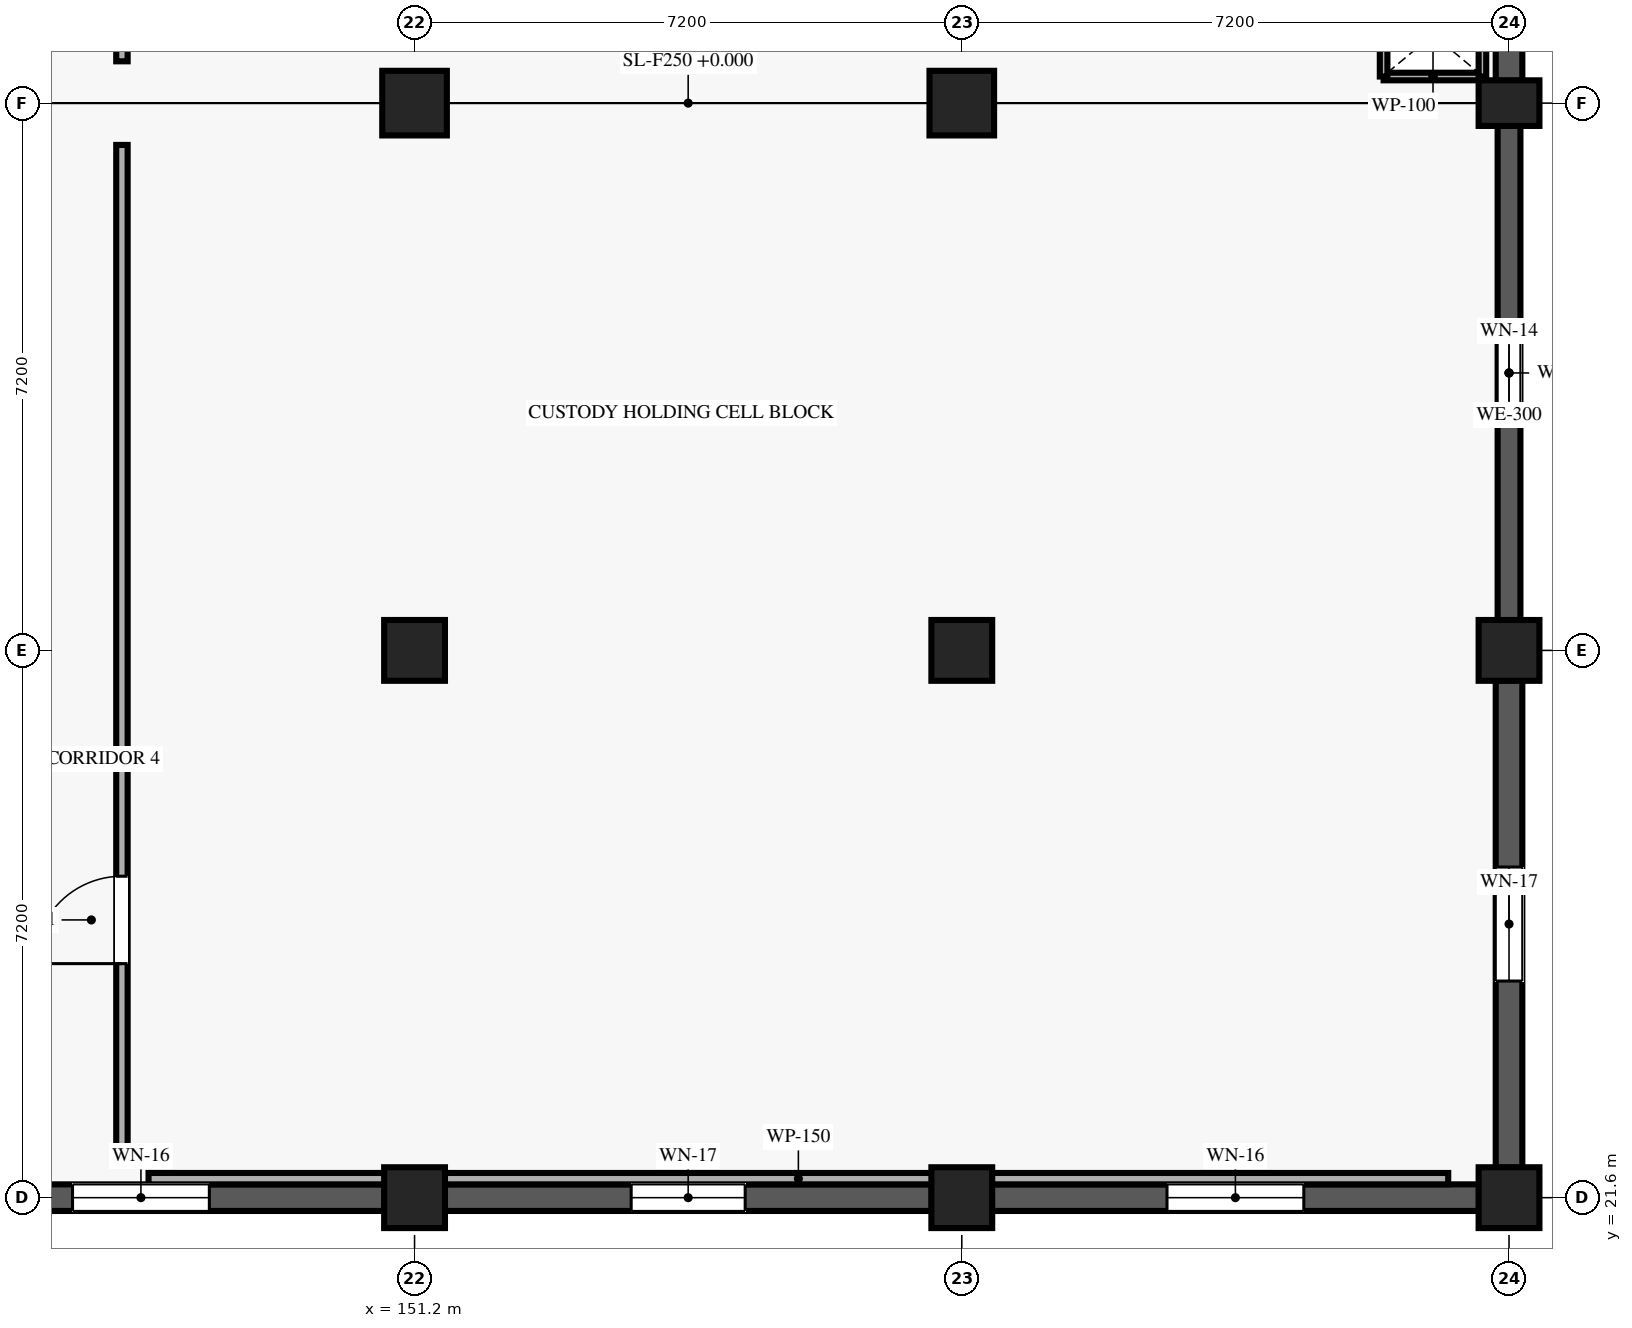
"""IFC4 building model, lengths in metres.
Left out: names, types, materials, properties, quantities, classifications, styles, units other than length and angle.
Written with IfcOpenShell. Run it as: python <this file> out.ifc"""

import sys

from ifc_helpers import new_model, si_unit, direction, frame, frame_2d, origin, origin_2d, place, context, subcontext, project, spatial, rectangle, extrude, element, fill, save


model = new_model("IFC4")
c1 = context("Model", 3, precision=1e-05, world=origin(), true_north=direction((0.0, 1.0)))
c2 = subcontext(c1, "Body", "Model", "MODEL_VIEW")
j1 = project(units=[si_unit("LENGTHUNIT", "METRE"), si_unit("PLANEANGLEUNIT", "RADIAN")], contexts=[c1])
p1 = place(None, origin())
s1 = spatial("IfcSite", under=j1, at=p1, CompositionType="ELEMENT")
p2 = place(p1, origin())
s2 = spatial("IfcBuilding", under=s1, at=p2, CompositionType="ELEMENT")
p3 = place(p2, origin())
s3 = spatial("IfcBuildingStorey", under=s2, at=p3, CompositionType="ELEMENT", Elevation=0.0)
for number, where, z_axis, x_axis in (
    (1, (151.2, 21.6, 0.0), (0.0, 0.0, 1.0), (1.0, 0.0, 0.0)),
    (2, (151.2, 28.8, 0.0), (0.0, 0.0, 1.0), (1.0, 0.0, 0.0)),
):
    element("IfcColumn", number, at=place(p3, frame(where, z_axis=z_axis, x_axis=x_axis)), inside=s3, PredefinedType="COLUMN", context=c2, shape_type="SweptSolid", body=[
        extrude(rectangle(XDim=0.8, YDim=0.8, at=origin_2d()), origin(), (0.0, 0.0, 1.0), 5.4),
    ])
p4 = place(p3, frame((151.2, 36.0, 0.0), z_axis=(0.0, 0.0, 1.0), x_axis=(1.0, 0.0, 0.0)))
e3 = element("IfcColumn", 3, at=p4, inside=s3, PredefinedType="COLUMN", context=c2, shape_type="SweptSolid", body=[
    extrude(rectangle(XDim=0.85, YDim=0.85, at=origin_2d()), origin(), (0.0, 0.0, 1.0), 5.4),
])
for number, where, z_axis, x_axis in (
    (4, (158.4, 21.6, 0.0), (0.0, 0.0, 1.0), (1.0, 0.0, 0.0)),
    (5, (158.4, 28.8, 0.0), (0.0, 0.0, 1.0), (1.0, 0.0, 0.0)),
):
    element("IfcColumn", number, at=place(p3, frame(where, z_axis=z_axis, x_axis=x_axis)), inside=s3, PredefinedType="COLUMN", context=c2, shape_type="SweptSolid", body=[
        extrude(rectangle(XDim=0.8, YDim=0.8, at=origin_2d()), origin(), (0.0, 0.0, 1.0), 5.4),
    ])
p5 = place(p3, frame((158.4, 36.0, 0.0), z_axis=(0.0, 0.0, 1.0), x_axis=(1.0, 0.0, 0.0)))
e6 = element("IfcColumn", 6, at=p5, inside=s3, PredefinedType="COLUMN", context=c2, shape_type="SweptSolid", body=[
    extrude(rectangle(XDim=0.85, YDim=0.85, at=origin_2d()), origin(), (0.0, 0.0, 1.0), 5.4),
])
for number, where, z_axis, x_axis in (
    (7, (165.6, 21.6, 0.0), (0.0, 0.0, 1.0), (1.0, 0.0, 0.0)),
    (8, (165.6, 28.8, 0.0), (0.0, 0.0, 1.0), (1.0, 0.0, 0.0)),
):
    element("IfcColumn", number, at=place(p3, frame(where, z_axis=z_axis, x_axis=x_axis)), inside=s3, PredefinedType="COLUMN", context=c2, shape_type="SweptSolid", body=[
        extrude(rectangle(XDim=0.8, YDim=0.8, at=origin_2d()), origin(), (0.0, 0.0, 1.0), 5.4),
    ])
p6 = place(p3, frame((165.6, 36.0, 0.0), z_axis=(0.0, 0.0, 1.0), x_axis=(0.0, 1.0, 0.0)))
e9 = element("IfcColumn", 9, at=p6, inside=s3, PredefinedType="COLUMN", context=c2, shape_type="SweptSolid", body=[
    extrude(rectangle(XDim=0.6, YDim=0.8, at=origin_2d()), origin(), (0.0, 0.0, 1.0), 5.4),
])
p7 = place(p3, frame((144.395, 21.6, 0.0), z_axis=(0.0, 0.0, 1.0), x_axis=(1.0, 0.0, 0.0)))
e10 = element("IfcWall", 10, at=p7, inside=s3, PredefinedType="SOLIDWALL", context=c2, shape_type="SweptSolid", body=[
    extrude(rectangle(XDim=6.41, YDim=0.35, at=frame_2d((3.205, 0.0))), origin(), (0.0, 0.0, 1.0), 5.16),
])
p8 = place(p7, frame((2.305, 0.0, 1.85)))
e11 = element("IfcOpeningElement", 11, at=p8, cuts=e10, PredefinedType="OPENING", context=c2, shape_type="SweptSolid", body=[
    extrude(rectangle(XDim=1.8, YDim=0.75, at=frame_2d((0.9, 0.375))), frame((0.0, 0.185, 0.0), z_axis=(0.0, -1.0, 0.0), x_axis=(1.0, 0.0, 0.0)), (0.0, 0.0, 1.0), 0.37),
])
p9 = place(p3, frame((151.595, 21.6, 0.0), z_axis=(0.0, 0.0, 1.0), x_axis=(1.0, 0.0, 0.0)))
e12 = element("IfcWall", 12, at=p9, inside=s3, PredefinedType="SOLIDWALL", context=c2, shape_type="SweptSolid", body=[
    extrude(rectangle(XDim=6.41, YDim=0.35, at=frame_2d((3.205, 0.0))), origin(), (0.0, 0.0, 1.0), 5.16),
])
p10 = place(p9, frame((2.455, 0.0, 1.85)))
e13 = element("IfcOpeningElement", 13, at=p10, cuts=e12, PredefinedType="OPENING", context=c2, shape_type="SweptSolid", body=[
    extrude(rectangle(XDim=1.5, YDim=0.7, at=frame_2d((0.75, 0.35))), frame((0.0, 0.185, 0.0), z_axis=(0.0, -1.0, 0.0), x_axis=(1.0, 0.0, 0.0)), (0.0, 0.0, 1.0), 0.37),
])
p11 = place(p3, frame((158.795, 21.6, 0.0), z_axis=(0.0, 0.0, 1.0), x_axis=(1.0, 0.0, 0.0)))
e14 = element("IfcWall", 14, at=p11, inside=s3, PredefinedType="SOLIDWALL", context=c2, shape_type="SweptSolid", body=[
    extrude(rectangle(XDim=6.41, YDim=0.35, at=frame_2d((3.205, 0.0))), origin(), (0.0, 0.0, 1.0), 5.16),
])
p12 = place(p11, frame((2.305, 0.0, 1.85)))
e15 = element("IfcOpeningElement", 15, at=p12, cuts=e14, PredefinedType="OPENING", context=c2, shape_type="SweptSolid", body=[
    extrude(rectangle(XDim=1.8, YDim=0.75, at=frame_2d((0.9, 0.375))), frame((0.0, 0.185, 0.0), z_axis=(0.0, -1.0, 0.0), x_axis=(1.0, 0.0, 0.0)), (0.0, 0.0, 1.0), 0.37),
])
p13 = place(p3, frame((165.6, 21.995, 0.0), z_axis=(0.0, 0.0, 1.0), x_axis=(0.0, 1.0, 0.0)))
e16 = element("IfcWall", 16, at=p13, inside=s3, PredefinedType="SOLIDWALL", context=c2, shape_type="SweptSolid", body=[
    extrude(rectangle(XDim=6.41, YDim=0.35, at=frame_2d((3.205, 0.0))), origin(), (0.0, 0.0, 1.0), 5.16),
])
p14 = place(p13, frame((2.455, 0.0, 1.85)))
e17 = element("IfcOpeningElement", 17, at=p14, cuts=e16, PredefinedType="OPENING", context=c2, shape_type="SweptSolid", body=[
    extrude(rectangle(XDim=1.5, YDim=0.7, at=frame_2d((0.75, 0.35))), frame((0.0, 0.185, 0.0), z_axis=(0.0, -1.0, 0.0), x_axis=(1.0, 0.0, 0.0)), (0.0, 0.0, 1.0), 0.37),
])
p15 = place(p3, frame((165.6, 29.195, 0.0), z_axis=(0.0, 0.0, 1.0), x_axis=(0.0, 1.0, 0.0)))
e18 = element("IfcWall", 18, at=p15, inside=s3, PredefinedType="SOLIDWALL", context=c2, shape_type="SweptSolid", body=[
    extrude(rectangle(XDim=6.51, YDim=0.3, at=frame_2d((3.255, 0.0))), origin(), (0.0, 0.0, 1.0), 5.16),
])
p16 = place(p15, frame((2.63, 0.0, 0.85)))
e19 = element("IfcOpeningElement", 19, at=p16, cuts=e18, PredefinedType="OPENING", context=c2, shape_type="SweptSolid", body=[
    extrude(rectangle(XDim=1.25, YDim=1.5, at=frame_2d((0.625, 0.75))), frame((0.0, 0.16, 0.0), z_axis=(0.0, -1.0, 0.0), x_axis=(1.0, 0.0, 0.0)), (0.0, 0.0, 1.0), 0.32),
])
p17 = place(p3, frame((165.6, 36.295, 0.0), z_axis=(0.0, 0.0, 1.0), x_axis=(0.0, 1.0, 0.0)))
e20 = element("IfcWall", 20, at=p17, inside=s3, PredefinedType="SOLIDWALL", context=c2, shape_type="SweptSolid", body=[
    extrude(rectangle(XDim=3.085, YDim=0.35, at=frame_2d((1.542, 0.0))), origin(), (0.0, 0.0, 1.0), 5.16),
])
p18 = place(p17, frame((0.792, 0.0, 1.85)))
e21 = element("IfcOpeningElement", 21, at=p18, cuts=e20, PredefinedType="OPENING", context=c2, shape_type="SweptSolid", body=[
    extrude(rectangle(XDim=1.5, YDim=0.7, at=frame_2d((0.75, 0.35))), frame((0.0, 0.185, 0.0), z_axis=(0.0, -1.0, 0.0), x_axis=(1.0, 0.0, 0.0)), (0.0, 0.0, 1.0), 0.37),
])
p19 = place(p3, frame((163.95, 36.35, 0.0), z_axis=(0.0, 0.0, 1.0), x_axis=(1.0, 0.0, 0.0)))
e22 = element("IfcWall", 22, at=p19, inside=s3, PredefinedType="PARTITIONING", context=c2, shape_type="SweptSolid", body=[
    extrude(rectangle(XDim=1.3, YDim=0.1, at=frame_2d((0.65, 0.0))), origin(), (0.0, 0.0, 1.0), 4.5),
])
p20 = place(p3, frame((163.95, 36.35, 0.0), z_axis=(0.0, 0.0, 1.0), x_axis=(0.0, 1.0, 0.0)))
e23 = element("IfcWall", 23, at=p20, inside=s3, PredefinedType="PARTITIONING", context=c2, shape_type="SweptSolid", body=[
    extrude(rectangle(XDim=1.1, YDim=0.1, at=frame_2d((0.55, 0.0))), origin(), (0.0, 0.0, 1.0), 5.16),
])
p21 = place(p3, frame((165.25, 36.35, 0.0), z_axis=(0.0, 0.0, 1.0), x_axis=(0.0, 1.0, 0.0)))
e24 = element("IfcWall", 24, at=p21, inside=s3, PredefinedType="PARTITIONING", context=c2, shape_type="SweptSolid", body=[
    extrude(rectangle(XDim=1.1, YDim=0.1, at=frame_2d((0.55, 0.0))), origin(), (0.0, 0.0, 1.0), 4.45),
])
p22 = place(p3, frame((147.35, 36.55, 0.0), z_axis=(0.0, 0.0, 1.0), x_axis=(0.0, 1.0, 0.0)))
e25 = element("IfcWall", 25, at=p22, inside=s3, PredefinedType="PARTITIONING", context=c2, shape_type="SweptSolid", body=[
    extrude(rectangle(XDim=15.95, YDim=0.15, at=frame_2d((7.975, 0.0))), origin(), (0.0, 0.0, 1.0), 5.16),
])
p23 = place(p22, frame((2.508, 0.0, 0.0)))
e26 = element("IfcOpeningElement", 26, at=p23, cuts=e25, PredefinedType="OPENING", context=c2, shape_type="SweptSolid", body=[
    extrude(rectangle(XDim=1.15, YDim=2.15, at=frame_2d((0.575, 1.075))), frame((0.0, 0.085, 0.0), z_axis=(0.0, -1.0, 0.0), x_axis=(1.0, 0.0, 0.0)), (0.0, 0.0, 1.0), 0.17),
])
p24 = place(p3, frame((147.7, 21.85, 0.0), z_axis=(0.0, 0.0, 1.0), x_axis=(1.0, 0.0, 0.0)))
e27 = element("IfcWall", 27, at=p24, inside=s3, PredefinedType="PARTITIONING", context=c2, shape_type="SweptSolid", body=[
    extrude(rectangle(XDim=17.1, YDim=0.15, at=frame_2d((8.55, 0.0))), origin(), (0.0, 0.0, 1.0), 4.45),
])
p25 = place(p3, frame((147.35, 22.15, 0.0), z_axis=(0.0, 0.0, 1.0), x_axis=(0.0, 1.0, 0.0)))
e28 = element("IfcWall", 28, at=p25, inside=s3, PredefinedType="PARTITIONING", context=c2, shape_type="SweptSolid", body=[
    extrude(rectangle(XDim=13.3, YDim=0.15, at=frame_2d((6.65, 0.0))), origin(), (0.0, 0.0, 1.0), 5.16),
])
p26 = place(p25, frame((2.529, 0.0, 0.0)))
e29 = element("IfcOpeningElement", 29, at=p26, cuts=e28, PredefinedType="OPENING", context=c2, shape_type="SweptSolid", body=[
    extrude(rectangle(XDim=1.15, YDim=2.15, at=frame_2d((0.575, 1.075))), frame((0.0, 0.085, 0.0), z_axis=(0.0, -1.0, 0.0), x_axis=(1.0, 0.0, 0.0)), (0.0, 0.0, 1.0), 0.17),
])
p27 = place(p8, origin())
e30 = element("IfcWindow", 30, at=p27, inside=s3, PartitioningType="SINGLE_PANEL", PredefinedType="WINDOW", context=c2, shape_type="SweptSolid", body=[
    extrude(rectangle(XDim=1.8, YDim=0.75, at=frame_2d((0.9, 0.375))), frame((0.0, 0.03, 0.0), z_axis=(0.0, -1.0, 0.0), x_axis=(1.0, 0.0, 0.0)), (0.0, 0.0, 1.0), 0.06),
])
fill(e11, e30)
p28 = place(p10, origin())
e31 = element("IfcWindow", 31, at=p28, inside=s3, PartitioningType="SINGLE_PANEL", PredefinedType="WINDOW", context=c2, shape_type="SweptSolid", body=[
    extrude(rectangle(XDim=1.5, YDim=0.7, at=frame_2d((0.75, 0.35))), frame((0.0, 0.03, 0.0), z_axis=(0.0, -1.0, 0.0), x_axis=(1.0, 0.0, 0.0)), (0.0, 0.0, 1.0), 0.06),
])
fill(e13, e31)
p29 = place(p12, origin())
e32 = element("IfcWindow", 32, at=p29, inside=s3, PartitioningType="SINGLE_PANEL", PredefinedType="WINDOW", context=c2, shape_type="SweptSolid", body=[
    extrude(rectangle(XDim=1.8, YDim=0.75, at=frame_2d((0.9, 0.375))), frame((0.0, 0.03, 0.0), z_axis=(0.0, -1.0, 0.0), x_axis=(1.0, 0.0, 0.0)), (0.0, 0.0, 1.0), 0.06),
])
fill(e15, e32)
p30 = place(p14, origin())
e33 = element("IfcWindow", 33, at=p30, inside=s3, PartitioningType="SINGLE_PANEL", PredefinedType="WINDOW", context=c2, shape_type="SweptSolid", body=[
    extrude(rectangle(XDim=1.5, YDim=0.7, at=frame_2d((0.75, 0.35))), frame((0.0, 0.03, 0.0), z_axis=(0.0, -1.0, 0.0), x_axis=(1.0, 0.0, 0.0)), (0.0, 0.0, 1.0), 0.06),
])
fill(e17, e33)
p31 = place(p16, origin())
e34 = element("IfcWindow", 34, at=p31, inside=s3, PartitioningType="SINGLE_PANEL", PredefinedType="WINDOW", context=c2, shape_type="SweptSolid", body=[
    extrude(rectangle(XDim=1.25, YDim=1.5, at=frame_2d((0.625, 0.75))), frame((0.0, 0.03, 0.0), z_axis=(0.0, -1.0, 0.0), x_axis=(1.0, 0.0, 0.0)), (0.0, 0.0, 1.0), 0.06),
])
fill(e19, e34)
p32 = place(p26, origin())
e35 = element("IfcDoor", 35, at=p32, inside=s3, OperationType="SINGLE_SWING_LEFT", PredefinedType="DOOR", context=c2, shape_type="SweptSolid", body=[
    extrude(rectangle(XDim=1.15, YDim=2.15, at=frame_2d((0.575, 1.075))), frame((0.0, 0.025, 0.0), z_axis=(0.0, -1.0, 0.0), x_axis=(1.0, 0.0, 0.0)), (0.0, 0.0, 1.0), 0.05),
])
fill(e29, e35)
save(model, sys.argv[1])
